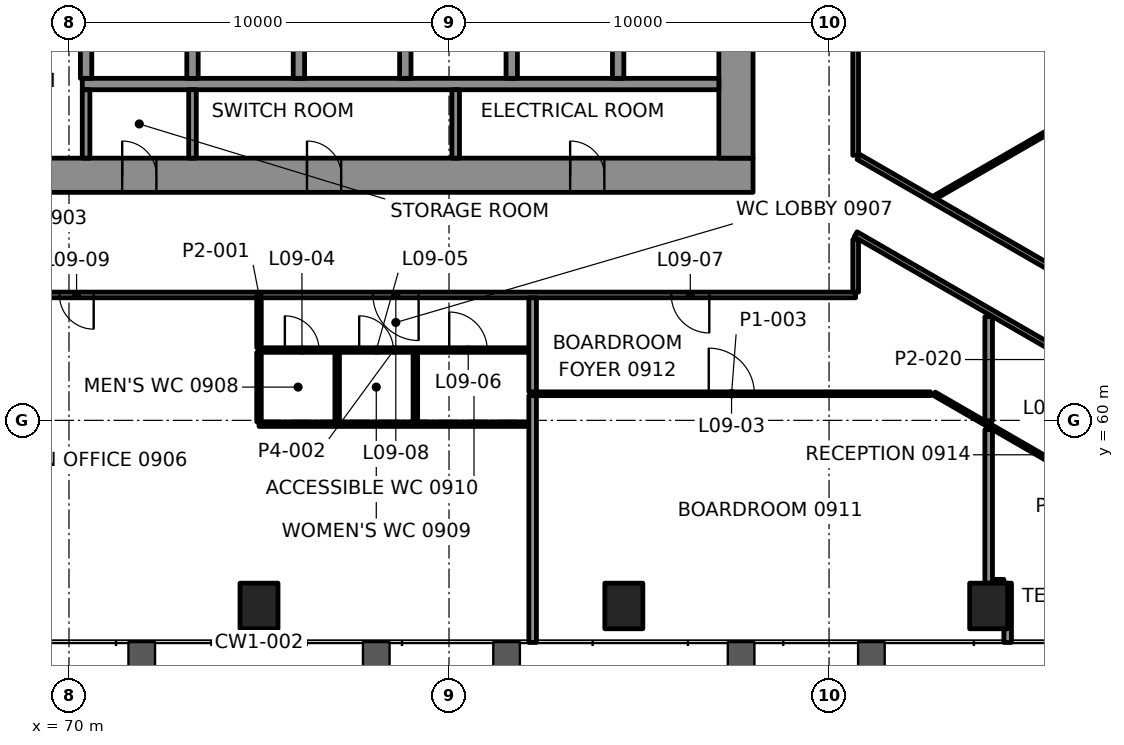
"""IFC4 building model, lengths in metres.
Left out: names, types, materials, properties, quantities, classifications, styles, units other than length and angle.
Written with IfcOpenShell. Run it as: python <this file> out.ifc"""

import sys

from ifc_helpers import new_model, si_unit, direction, frame, frame_2d, origin, origin_2d, place, context, subcontext, project, spatial, rectangle, extrude, element, fill, save


model = new_model("IFC4")
c1 = context("Model", 3, precision=1e-05, world=origin(), true_north=direction((0.0, 1.0)))
c2 = subcontext(c1, "Body", "Model", "MODEL_VIEW")
j1 = project(units=[si_unit("LENGTHUNIT", "METRE"), si_unit("PLANEANGLEUNIT", "RADIAN")], contexts=[c1])
p1 = place(None, origin())
s1 = spatial("IfcSite", under=j1, at=p1, CompositionType="ELEMENT")
p2 = place(p1, origin())
s2 = spatial("IfcBuilding", under=s1, at=p2, CompositionType="ELEMENT")
p3 = place(p2, frame((0.0, 0.0, 44.2)))
s3 = spatial("IfcBuildingStorey", under=s2, at=p3, CompositionType="ELEMENT", Elevation=44.2)
for number, where, z_axis, x_axis in (
    (1, (75.0, 55.115, -0.0), (0.0, 0.0, 1.0), (1.0, 0.0, 0.0)),
    (2, (84.6, 55.115, -0.0), (0.0, 0.0, 1.0), (1.0, 0.0, 0.0)),
    (3, (94.2, 55.115, -0.0), (0.0, 0.0, 1.0), (1.0, 0.0, 0.0)),
):
    element("IfcColumn", number, at=place(p3, frame(where, z_axis=z_axis, x_axis=x_axis)), inside=s3, PredefinedType="COLUMN", context=c2, shape_type="SweptSolid", body=[
        extrude(rectangle(XDim=1.0, YDim=1.2, at=origin_2d()), origin(), (0.0, 0.0, 1.0), 4.2),
    ])
p4 = place(p3, frame((62.0, 66.45, 0.0), z_axis=(0.0, 0.0, 1.0), x_axis=(1.0, 0.0, 0.0)))
e4 = element("IfcWall", 4, at=p4, inside=s3, PredefinedType="SHEAR", context=c2, shape_type="SweptSolid", body=[
    extrude(rectangle(XDim=26.0, YDim=0.9, at=frame_2d((13.0, 0.0))), origin(), (0.0, 0.0, 1.0), 4.0),
])
p5 = place(p4, frame((3.45, 0.0, 0.0)))
e5 = element("IfcOpeningElement", 5, at=p5, cuts=e4, PredefinedType="OPENING", context=c2, shape_type="SweptSolid", body=[
    extrude(rectangle(XDim=0.9, YDim=2.1, at=frame_2d((0.45, 1.05))), frame((0.0, 0.46, 0.0), z_axis=(0.0, -1.0, 0.0), x_axis=(1.0, 0.0, 0.0)), (0.0, 0.0, 1.0), 0.92),
])
p6 = place(p4, frame((6.425, 0.0, 0.0)))
e6 = element("IfcOpeningElement", 6, at=p6, cuts=e4, PredefinedType="OPENING", context=c2, shape_type="SweptSolid", body=[
    extrude(rectangle(XDim=0.9, YDim=2.1, at=frame_2d((0.45, 1.05))), frame((0.0, 0.46, 0.0), z_axis=(0.0, -1.0, 0.0), x_axis=(1.0, 0.0, 0.0)), (0.0, 0.0, 1.0), 0.92),
])
p7 = place(p4, frame((9.4, 0.0, 0.0)))
e7 = element("IfcOpeningElement", 7, at=p7, cuts=e4, PredefinedType="OPENING", context=c2, shape_type="SweptSolid", body=[
    extrude(rectangle(XDim=0.9, YDim=2.1, at=frame_2d((0.45, 1.05))), frame((0.0, 0.46, 0.0), z_axis=(0.0, -1.0, 0.0), x_axis=(1.0, 0.0, 0.0)), (0.0, 0.0, 1.0), 0.92),
])
p8 = place(p4, frame((14.262, 0.0, 0.0)))
e8 = element("IfcOpeningElement", 8, at=p8, cuts=e4, PredefinedType="OPENING", context=c2, shape_type="SweptSolid", body=[
    extrude(rectangle(XDim=0.9, YDim=2.1, at=frame_2d((0.45, 1.05))), frame((0.0, 0.46, 0.0), z_axis=(0.0, -1.0, 0.0), x_axis=(1.0, 0.0, 0.0)), (0.0, 0.0, 1.0), 0.92),
])
p9 = place(p4, frame((21.188, 0.0, 0.0)))
e9 = element("IfcOpeningElement", 9, at=p9, cuts=e4, PredefinedType="OPENING", context=c2, shape_type="SweptSolid", body=[
    extrude(rectangle(XDim=0.9, YDim=2.1, at=frame_2d((0.45, 1.05))), frame((0.0, 0.46, 0.0), z_axis=(0.0, -1.0, 0.0), x_axis=(1.0, 0.0, 0.0)), (0.0, 0.0, 1.0), 0.92),
])
p10 = place(p3, frame((87.55, 66.9, 0.0), z_axis=(0.0, 0.0, 1.0), x_axis=(0.0, 1.0, 0.0)))
e10 = element("IfcWall", 10, at=p10, inside=s3, PredefinedType="SHEAR", context=c2, shape_type="SweptSolid", body=[
    extrude(rectangle(XDim=16.2, YDim=0.9, at=frame_2d((8.1, 0.0))), origin(), (0.0, 0.0, 1.0), 4.0),
])
p11 = place(p10, frame((5.5, 0.0, 0.0)))
e11 = element("IfcOpeningElement", 11, at=p11, cuts=e10, PredefinedType="OPENING", context=c2, shape_type="SweptSolid", body=[
    extrude(rectangle(XDim=1.8, YDim=2.1, at=frame_2d((0.9, 1.05))), frame((0.0, 0.46, 0.0), z_axis=(0.0, -1.0, 0.0), x_axis=(1.0, 0.0, 0.0)), (0.0, 0.0, 1.0), 0.92),
])
p12 = place(p10, frame((11.738, 0.0, 0.0)))
e12 = element("IfcOpeningElement", 12, at=p12, cuts=e10, PredefinedType="OPENING", context=c2, shape_type="SweptSolid", body=[
    extrude(rectangle(XDim=0.9, YDim=2.1, at=frame_2d((0.45, 1.05))), frame((0.0, 0.46, 0.0), z_axis=(0.0, -1.0, 0.0), x_axis=(1.0, 0.0, 0.0)), (0.0, 0.0, 1.0), 0.92),
])
p13 = place(p3, frame((70.35, 68.85, 0.0), z_axis=(0.0, 0.0, 1.0), x_axis=(1.0, 0.0, 0.0)))
e13 = element("IfcWall", 13, at=p13, inside=s3, PredefinedType="SHEAR", context=c2, shape_type="SweptSolid", body=[
    extrude(rectangle(XDim=16.75, YDim=0.3, at=frame_2d((8.375, 0.0))), origin(), (0.0, 0.0, 1.0), 4.0),
])
for number, where, z_axis, x_axis in (
    (14, (70.45, 69.0, 0.0), (0.0, 0.0, 1.0), (0.0, 1.0, 0.0)),
    (15, (73.25, 69.0, 0.0), (0.0, 0.0, 1.0), (0.0, 1.0, 0.0)),
    (16, (76.05, 69.0, 0.0), (0.0, 0.0, 1.0), (0.0, 1.0, 0.0)),
    (17, (78.85, 69.0, 0.0), (0.0, 0.0, 1.0), (0.0, 1.0, 0.0)),
    (18, (81.65, 69.0, 0.0), (0.0, 0.0, 1.0), (0.0, 1.0, 0.0)),
    (19, (84.45, 69.0, 0.0), (0.0, 0.0, 1.0), (0.0, 1.0, 0.0)),
):
    element("IfcWall", number, at=place(p3, frame(where, z_axis=z_axis, x_axis=x_axis)), inside=s3, PredefinedType="SHEAR", context=c2, shape_type="SweptSolid", body=[
        extrude(rectangle(XDim=2.6, YDim=0.3, at=frame_2d((1.3, 0.0))), origin(), (0.0, 0.0, 1.0), 4.0),
    ])
p14 = place(p3, frame((94.3, 55.715, 0.0), z_axis=(0.0, 0.0, 1.0), x_axis=(1.0, 0.0, 0.0)))
e20 = element("IfcWall", 20, at=p14, inside=s3, PredefinedType="PARTITIONING", context=c2, shape_type="SweptSolid", body=[
    extrude(rectangle(XDim=0.3, YDim=0.2, at=frame_2d((0.15, 0.0))), origin(), (0.0, 0.0, 1.0), 3.4),
])
p15 = place(p3, frame((75.0, 59.9, 0.0), z_axis=(0.0, 0.0, 1.0), x_axis=(1.0, 0.0, 0.0)))
e21 = element("IfcWall", 21, at=p15, inside=s3, PredefinedType="PARTITIONING", context=c2, shape_type="SweptSolid", body=[
    extrude(rectangle(XDim=7.1, YDim=0.12, at=frame_2d((3.55, 0.0))), origin(), (0.0, 0.0, 1.0), 3.4),
])
p16 = place(p3, frame((82.2, 60.7, 0.0), z_axis=(0.0, 0.0, 1.0), x_axis=(1.0, 0.0, 0.0)))
e22 = element("IfcWall", 22, at=p16, inside=s3, PredefinedType="PARTITIONING", context=c2, shape_type="SweptSolid", body=[
    extrude(rectangle(XDim=10.468, YDim=0.1, at=frame_2d((5.234, 0.0))), origin(), (0.0, 0.0, 1.0), 3.4),
])
p17 = place(p16, frame((4.634, 0.0, 0.0)))
e23 = element("IfcOpeningElement", 23, at=p17, cuts=e22, PredefinedType="OPENING", context=c2, shape_type="SweptSolid", body=[
    extrude(rectangle(XDim=1.2, YDim=2.1, at=frame_2d((0.6, 1.05))), frame((0.0, 0.06, 0.0), z_axis=(0.0, -1.0, 0.0), x_axis=(1.0, 0.0, 0.0)), (0.0, 0.0, 1.0), 0.12),
])
p18 = place(p3, frame((75.0, 61.85, 0.0), z_axis=(0.0, 0.0, 1.0), x_axis=(1.0, 0.0, 0.0)))
e24 = element("IfcWall", 24, at=p18, inside=s3, PredefinedType="PARTITIONING", context=c2, shape_type="SweptSolid", body=[
    extrude(rectangle(XDim=7.1, YDim=0.12, at=frame_2d((3.55, 0.0))), origin(), (0.0, 0.0, 1.0), 3.4),
])
p19 = place(p18, frame((0.68, 0.0, 0.0)))
e25 = element("IfcOpeningElement", 25, at=p19, cuts=e24, PredefinedType="OPENING", context=c2, shape_type="SweptSolid", body=[
    extrude(rectangle(XDim=0.9, YDim=2.1, at=frame_2d((0.45, 1.05))), frame((0.0, 0.07, 0.0), z_axis=(0.0, -1.0, 0.0), x_axis=(1.0, 0.0, 0.0)), (0.0, 0.0, 1.0), 0.14),
])
p20 = place(p18, frame((2.636, 0.0, 0.0)))
e26 = element("IfcOpeningElement", 26, at=p20, cuts=e24, PredefinedType="OPENING", context=c2, shape_type="SweptSolid", body=[
    extrude(rectangle(XDim=0.9, YDim=2.1, at=frame_2d((0.45, 1.05))), frame((0.0, 0.07, 0.0), z_axis=(0.0, -1.0, 0.0), x_axis=(1.0, 0.0, 0.0)), (0.0, 0.0, 1.0), 0.14),
])
p21 = place(p18, frame((5.006, 0.0, 0.0)))
e27 = element("IfcOpeningElement", 27, at=p21, cuts=e24, PredefinedType="OPENING", context=c2, shape_type="SweptSolid", body=[
    extrude(rectangle(XDim=1.0, YDim=2.1, at=frame_2d((0.5, 1.05))), frame((0.0, 0.07, 0.0), z_axis=(0.0, -1.0, 0.0), x_axis=(1.0, 0.0, 0.0)), (0.0, 0.0, 1.0), 0.14),
])
p22 = place(p3, frame((90.7, 63.3, 0.0), z_axis=(0.0, 0.0, 1.0), x_axis=(-1.0, 0.0, 0.0)))
e28 = element("IfcWall", 28, at=p22, inside=s3, PredefinedType="PARTITIONING", context=c2, shape_type="SweptSolid", body=[
    extrude(rectangle(XDim=31.4, YDim=0.15, at=frame_2d((15.7, 0.0))), origin(), (0.0, 0.0, 1.0), 3.4),
])
p23 = place(p22, frame((3.852, 0.0, 0.0)))
e29 = element("IfcOpeningElement", 29, at=p23, cuts=e28, PredefinedType="OPENING", context=c2, shape_type="SweptSolid", body=[
    extrude(rectangle(XDim=1.0, YDim=2.1, at=frame_2d((0.5, 1.05))), frame((0.0, 0.085, 0.0), z_axis=(0.0, -1.0, 0.0), x_axis=(1.0, 0.0, 0.0)), (0.0, 0.0, 1.0), 0.17),
])
p24 = place(p22, frame((11.5, 0.0, 0.0)))
e30 = element("IfcOpeningElement", 30, at=p24, cuts=e28, PredefinedType="OPENING", context=c2, shape_type="SweptSolid", body=[
    extrude(rectangle(XDim=1.2, YDim=2.1, at=frame_2d((0.6, 1.05))), frame((0.0, 0.085, 0.0), z_axis=(0.0, -1.0, 0.0), x_axis=(1.0, 0.0, 0.0)), (0.0, 0.0, 1.0), 0.17),
])
p25 = place(p22, frame((20.05, 0.0, 0.0)))
e31 = element("IfcOpeningElement", 31, at=p25, cuts=e28, PredefinedType="OPENING", context=c2, shape_type="SweptSolid", body=[
    extrude(rectangle(XDim=0.9, YDim=2.1, at=frame_2d((0.45, 1.05))), frame((0.0, 0.085, 0.0), z_axis=(0.0, -1.0, 0.0), x_axis=(1.0, 0.0, 0.0)), (0.0, 0.0, 1.0), 0.17),
])
p26 = place(p22, frame((27.749, 0.0, 0.0)))
e32 = element("IfcOpeningElement", 32, at=p26, cuts=e28, PredefinedType="OPENING", context=c2, shape_type="SweptSolid", body=[
    extrude(rectangle(XDim=1.0, YDim=2.1, at=frame_2d((0.5, 1.05))), frame((0.0, 0.085, 0.0), z_axis=(0.0, -1.0, 0.0), x_axis=(1.0, 0.0, 0.0)), (0.0, 0.0, 1.0), 0.17),
])
p27 = place(p3, frame((92.801, 65.878, 0.0), z_axis=(0.0, 0.0, 1.0), x_axis=(0.86602359872, 0.50000312645, 0.0)))
e33 = element("IfcWall", 33, at=p27, inside=s3, PredefinedType="PARTITIONING", context=c2, shape_type="SweptSolid", body=[
    extrude(rectangle(XDim=9.989, YDim=0.1, at=frame_2d((4.995, 0.0))), origin(), (0.0, 0.0, 1.0), 3.165),
])
p28 = place(p3, frame((94.7, 54.155, 0.0), z_axis=(0.0, 0.0, 1.0), x_axis=(0.0, 1.0, 0.0)))
e34 = element("IfcWall", 34, at=p28, inside=s3, PredefinedType="PARTITIONING", context=c2, shape_type="SweptSolid", body=[
    extrude(rectangle(XDim=1.56, YDim=0.2, at=frame_2d((0.78, 0.0))), origin(), (0.0, 0.0, 1.0), 3.4),
])
p29 = place(p3, frame((94.2, 55.715, 0.0), z_axis=(0.0, 0.0, 1.0), x_axis=(0.0, 1.0, 0.0)))
e35 = element("IfcWall", 35, at=p29, inside=s3, PredefinedType="PARTITIONING", context=c2, shape_type="SweptSolid", body=[
    extrude(rectangle(XDim=4.043, YDim=0.2, at=frame_2d((2.021, 0.0))), origin(), (0.0, 0.0, 1.0), 3.4),
])
p30 = place(p3, frame((90.7, 63.375, 0.0), z_axis=(0.0, 0.0, 1.0), x_axis=(0.0, 1.0, 0.0)))
e36 = element("IfcWall", 36, at=p30, inside=s3, PredefinedType="PARTITIONING", context=c2, shape_type="SweptSolid", body=[
    extrude(rectangle(XDim=1.385, YDim=0.15, at=frame_2d((0.692, 0.0))), origin(), (0.0, 0.0, 1.0), 3.247),
])
p31 = place(p3, frame((90.7, 86.699, 0.0), z_axis=(0.0, 0.0, 1.0), x_axis=(0.0, -1.0, 0.0)))
e37 = element("IfcWall", 37, at=p31, inside=s3, PredefinedType="PARTITIONING", context=c2, shape_type="SweptSolid", body=[
    extrude(rectangle(XDim=19.725, YDim=0.15, at=frame_2d((9.862, 0.0))), origin(), (0.0, 0.0, 1.0), 3.4),
])
p32 = place(p31, frame((14.785, 0.0, 0.0)))
e38 = element("IfcOpeningElement", 38, at=p32, cuts=e37, PredefinedType="OPENING", context=c2, shape_type="SweptSolid", body=[
    extrude(rectangle(XDim=0.9, YDim=2.1, at=frame_2d((0.45, 1.05))), frame((0.0, 0.085, 0.0), z_axis=(0.0, -1.0, 0.0), x_axis=(1.0, 0.0, 0.0)), (0.0, 0.0, 1.0), 0.17),
])
p33 = place(p3, frame((82.2, 54.155, 0.0), z_axis=(0.0, 0.0, 1.0), x_axis=(0.0, 1.0, 0.0)))
e39 = element("IfcWall", 39, at=p33, inside=s3, PredefinedType="PARTITIONING", context=c2, shape_type="SweptSolid", body=[
    extrude(rectangle(XDim=6.495, YDim=0.2, at=frame_2d((3.247, 0.0))), origin(), (0.0, 0.0, 1.0), 3.165),
])
for number, where, z_axis, x_axis in (
    (40, (79.114, 59.96, 0.0), (0.0, 0.0, 1.0), (0.0, 1.0, 0.0)),
    (41, (77.057, 59.96, 0.0), (0.0, 0.0, 1.0), (0.0, 1.0, 0.0)),
    (42, (75.0, 59.96, 0.0), (0.0, 0.0, 1.0), (0.0, 1.0, 0.0)),
):
    element("IfcWall", number, at=place(p3, frame(where, z_axis=z_axis, x_axis=x_axis)), inside=s3, PredefinedType="PARTITIONING", context=c2, shape_type="SweptSolid", body=[
        extrude(rectangle(XDim=1.83, YDim=0.12, at=frame_2d((0.915, 0.0))), origin(), (0.0, 0.0, 1.0), 3.4),
    ])
p34 = place(p3, frame((90.775, 66.932, 0.0), z_axis=(0.0, 0.0, 1.0), x_axis=(0.86602195393, -0.500005975275, 0.0)))
e43 = element("IfcWall", 43, at=p34, inside=s3, PredefinedType="PARTITIONING", context=c2, shape_type="SweptSolid", body=[
    extrude(rectangle(XDim=14.137, YDim=0.15, at=frame_2d((7.069, 0.0))), origin(), (0.0, 0.0, 1.0), 3.4),
])
p35 = place(p34, frame((7.629, 0.0, 0.0)))
e44 = element("IfcOpeningElement", 44, at=p35, cuts=e43, PredefinedType="OPENING", context=c2, shape_type="SweptSolid", body=[
    extrude(rectangle(XDim=0.9, YDim=2.1, at=frame_2d((0.45, 1.05))), frame((0.0, 0.085, 0.0), z_axis=(0.0, -1.0, 0.0), x_axis=(1.0, 0.0, 0.0)), (0.0, 0.0, 1.0), 0.17),
])
p36 = place(p3, frame((102.118, 58.304, 0.0), z_axis=(0.0, 0.0, 1.0), x_axis=(-0.866022774611, 0.500004553834, 0.0)))
e45 = element("IfcWall", 45, at=p36, inside=s3, PredefinedType="PARTITIONING", context=c2, shape_type="SweptSolid", body=[
    extrude(rectangle(XDim=13.185, YDim=0.15, at=frame_2d((6.593, 0.0))), origin(), (0.0, 0.0, 1.0), 3.247),
])
p37 = place(p36, frame((4.173, 0.0, 0.0)))
e46 = element("IfcOpeningElement", 46, at=p37, cuts=e45, PredefinedType="OPENING", context=c2, shape_type="SweptSolid", body=[
    extrude(rectangle(XDim=1.0, YDim=2.1, at=frame_2d((0.5, 1.05))), frame((0.0, 0.085, 0.0), z_axis=(0.0, -1.0, 0.0), x_axis=(1.0, 0.0, 0.0)), (0.0, 0.0, 1.0), 0.17),
])
p38 = place(p3, frame((92.768, 60.7, 0.0), z_axis=(0.0, 0.0, 1.0), x_axis=(0.866025640697, -0.499999589656, 0.0)))
e47 = element("IfcWall", 47, at=p38, inside=s3, PredefinedType="PARTITIONING", context=c2, shape_type="SweptSolid", body=[
    extrude(rectangle(XDim=11.896, YDim=0.1, at=frame_2d((5.948, 0.0))), origin(), (0.0, 0.0, 1.0), 3.4),
])
p39 = place(p38, frame((6.175, 0.0, 0.0)))
e48 = element("IfcOpeningElement", 48, at=p39, cuts=e47, PredefinedType="OPENING", context=c2, shape_type="SweptSolid", body=[
    extrude(rectangle(XDim=1.0, YDim=2.1, at=frame_2d((0.5, 1.05))), frame((0.0, 0.06, 0.0), z_axis=(0.0, -1.0, 0.0), x_axis=(1.0, 0.0, 0.0)), (0.0, 0.0, 1.0), 0.12),
])
p40 = place(p3, frame((82.2, 60.75, 0.0), z_axis=(0.0, 0.0, 1.0), x_axis=(0.0, 1.0, 0.0)))
e49 = element("IfcWall", 49, at=p40, inside=s3, PredefinedType="PARTITIONING", context=c2, shape_type="SweptSolid", body=[
    extrude(rectangle(XDim=2.475, YDim=0.2, at=frame_2d((1.238, 0.0))), origin(), (0.0, 0.0, 1.0), 3.4),
])
p41 = place(p3, frame((75.0, 61.91, 0.0), z_axis=(0.0, 0.0, 1.0), x_axis=(0.0, 1.0, 0.0)))
e50 = element("IfcWall", 50, at=p41, inside=s3, PredefinedType="PARTITIONING", context=c2, shape_type="SweptSolid", body=[
    extrude(rectangle(XDim=1.315, YDim=0.12, at=frame_2d((0.658, 0.0))), origin(), (0.0, 0.0, 1.0), 3.4),
])
p42 = place(p3, frame((94.2, 59.989, 0.0), z_axis=(0.0, 0.0, 1.0), x_axis=(0.0, 1.0, 0.0)))
e51 = element("IfcWall", 51, at=p42, inside=s3, PredefinedType="PARTITIONING", context=c2, shape_type="SweptSolid", body=[
    extrude(rectangle(XDim=2.74, YDim=0.2, at=frame_2d((1.37, 0.0))), origin(), (0.0, 0.0, 1.0), 3.4),
])
for number, where, z_axis, x_axis in (
    (52, (70.45, 66.9, 0.0), (0.0, 0.0, 1.0), (0.0, 1.0, 0.0)),
    (53, (73.25, 66.9, 0.0), (0.0, 0.0, 1.0), (0.0, 1.0, 0.0)),
    (54, (80.175, 66.9, 0.0), (0.0, 0.0, 1.0), (0.0, 1.0, 0.0)),
):
    element("IfcWall", number, at=place(p3, frame(where, z_axis=z_axis, x_axis=x_axis)), inside=s3, PredefinedType="PARTITIONING", context=c2, shape_type="SweptSolid", body=[
        extrude(rectangle(XDim=1.8, YDim=0.2, at=frame_2d((0.9, 0.0))), origin(), (0.0, 0.0, 1.0), 4.0),
    ])
p43 = place(p17, origin())
e55 = element("IfcDoor", 55, at=p43, inside=s3, OperationType="DOUBLE_DOOR_SINGLE_SWING", PredefinedType="DOOR", context=c2, shape_type="SweptSolid", body=[
    extrude(rectangle(XDim=1.2, YDim=2.1, at=frame_2d((0.6, 1.05))), frame((0.0, 0.025, 0.0), z_axis=(0.0, -1.0, 0.0), x_axis=(1.0, 0.0, 0.0)), (0.0, 0.0, 1.0), 0.05),
])
fill(e23, e55)
p44 = place(p19, origin())
e56 = element("IfcDoor", 56, at=p44, inside=s3, OperationType="SINGLE_SWING_LEFT", PredefinedType="DOOR", context=c2, shape_type="SweptSolid", body=[
    extrude(rectangle(XDim=0.9, YDim=2.1, at=frame_2d((0.45, 1.05))), frame((0.0, 0.025, 0.0), z_axis=(0.0, -1.0, 0.0), x_axis=(1.0, 0.0, 0.0)), (0.0, 0.0, 1.0), 0.05),
])
fill(e25, e56)
p45 = place(p20, origin())
e57 = element("IfcDoor", 57, at=p45, inside=s3, OperationType="SINGLE_SWING_RIGHT", PredefinedType="DOOR", context=c2, shape_type="SweptSolid", body=[
    extrude(rectangle(XDim=0.9, YDim=2.1, at=frame_2d((0.45, 1.05))), frame((0.0, 0.025, 0.0), z_axis=(0.0, -1.0, 0.0), x_axis=(1.0, 0.0, 0.0)), (0.0, 0.0, 1.0), 0.05),
])
fill(e26, e57)
p46 = place(p21, origin())
e58 = element("IfcDoor", 58, at=p46, inside=s3, OperationType="SINGLE_SWING_LEFT", PredefinedType="DOOR", context=c2, shape_type="SweptSolid", body=[
    extrude(rectangle(XDim=1.0, YDim=2.1, at=frame_2d((0.5, 1.05))), frame((0.0, 0.025, 0.0), z_axis=(0.0, -1.0, 0.0), x_axis=(1.0, 0.0, 0.0)), (0.0, 0.0, 1.0), 0.05),
])
fill(e27, e58)
p47 = place(p23, origin())
e59 = element("IfcDoor", 59, at=p47, inside=s3, OperationType="SINGLE_SWING_RIGHT", PredefinedType="DOOR", context=c2, shape_type="SweptSolid", body=[
    extrude(rectangle(XDim=1.0, YDim=2.1, at=frame_2d((0.5, 1.05))), frame((0.0, 0.025, 0.0), z_axis=(0.0, -1.0, 0.0), x_axis=(1.0, 0.0, 0.0)), (0.0, 0.0, 1.0), 0.05),
])
fill(e29, e59)
p48 = place(p24, origin())
e60 = element("IfcDoor", 60, at=p48, inside=s3, OperationType="DOUBLE_DOOR_SINGLE_SWING", PredefinedType="DOOR", context=c2, shape_type="SweptSolid", body=[
    extrude(rectangle(XDim=1.2, YDim=2.1, at=frame_2d((0.6, 1.05))), frame((0.0, 0.025, 0.0), z_axis=(0.0, -1.0, 0.0), x_axis=(1.0, 0.0, 0.0)), (0.0, 0.0, 1.0), 0.05),
])
fill(e30, e60)
p49 = place(p25, origin())
e61 = element("IfcDoor", 61, at=p49, inside=s3, OperationType="SINGLE_SWING_RIGHT", PredefinedType="DOOR", context=c2, shape_type="SweptSolid", body=[
    extrude(rectangle(XDim=0.9, YDim=2.1, at=frame_2d((0.45, 1.05))), frame((0.0, 0.025, 0.0), z_axis=(0.0, -1.0, 0.0), x_axis=(1.0, 0.0, 0.0)), (0.0, 0.0, 1.0), 0.05),
])
fill(e31, e61)
p50 = place(p7, origin())
e62 = element("IfcDoor", 62, at=p50, inside=s3, OperationType="SINGLE_SWING_LEFT", PredefinedType="DOOR", context=c2, shape_type="SweptSolid", body=[
    extrude(rectangle(XDim=0.9, YDim=2.1, at=frame_2d((0.45, 1.05))), frame((0.0, 0.17, 0.0), z_axis=(0.0, -1.0, 0.0), x_axis=(1.0, 0.0, 0.0)), (0.0, 0.0, 1.0), 0.34),
])
fill(e7, e62)
p51 = place(p8, origin())
e63 = element("IfcDoor", 63, at=p51, inside=s3, OperationType="SINGLE_SWING_RIGHT", PredefinedType="DOOR", context=c2, shape_type="SweptSolid", body=[
    extrude(rectangle(XDim=0.9, YDim=2.1, at=frame_2d((0.45, 1.05))), frame((0.0, 0.17, 0.0), z_axis=(0.0, -1.0, 0.0), x_axis=(1.0, 0.0, 0.0)), (0.0, 0.0, 1.0), 0.34),
])
fill(e8, e63)
p52 = place(p9, origin())
e64 = element("IfcDoor", 64, at=p52, inside=s3, OperationType="SINGLE_SWING_LEFT", PredefinedType="DOOR", context=c2, shape_type="SweptSolid", body=[
    extrude(rectangle(XDim=0.9, YDim=2.1, at=frame_2d((0.45, 1.05))), frame((0.0, 0.17, 0.0), z_axis=(0.0, -1.0, 0.0), x_axis=(1.0, 0.0, 0.0)), (0.0, 0.0, 1.0), 0.34),
])
fill(e9, e64)
save(model, sys.argv[1])
